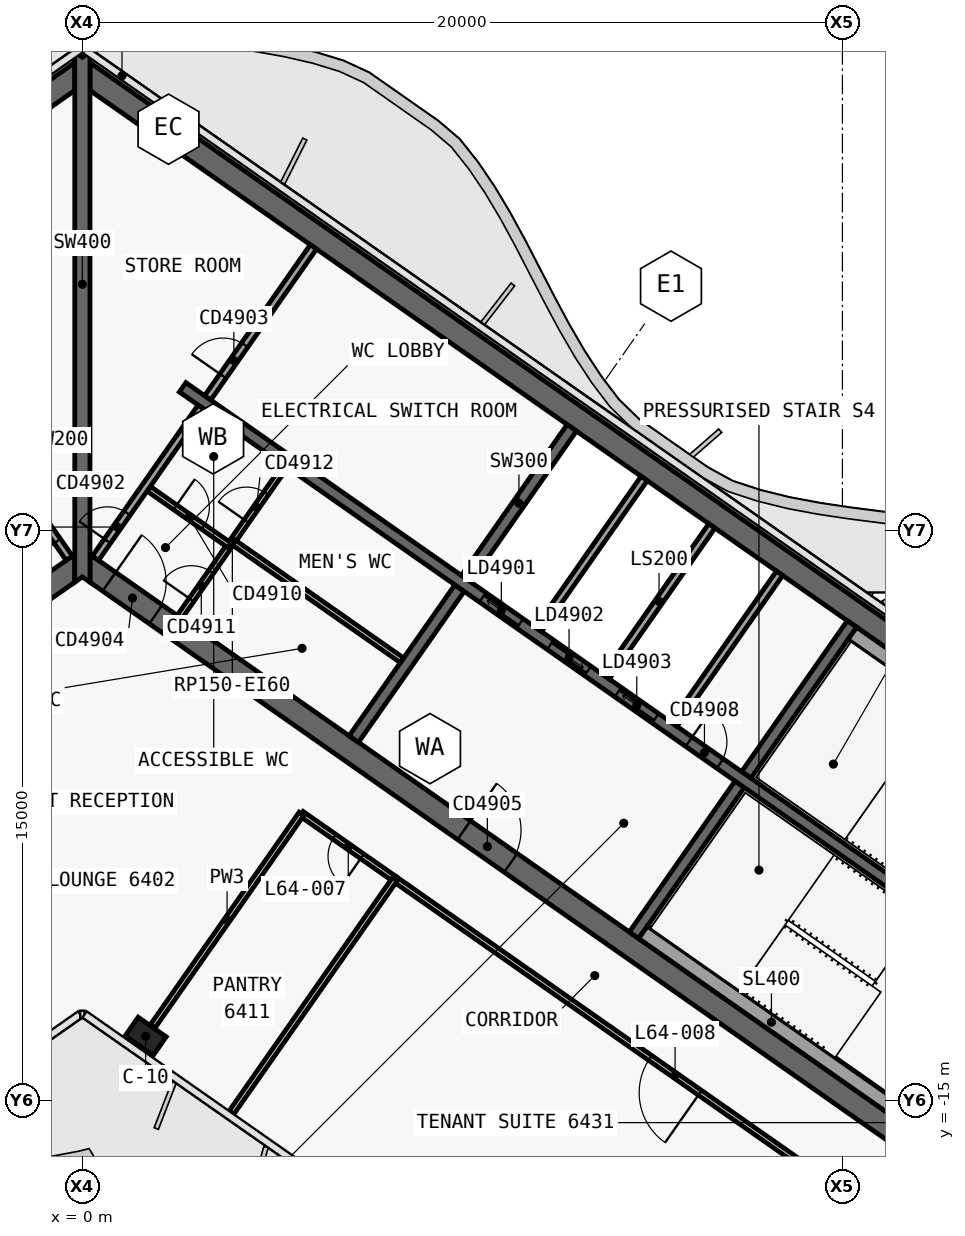
"""IFC4 building model, lengths in metres.
Left out: names, types, materials, properties, quantities, classifications, styles, units other than length and angle.
Written with IfcOpenShell. Run it as: python <this file> out.ifc"""

import sys

from ifc_helpers import new_model, si_unit, direction, frame, frame_2d, origin, origin_2d, place, context, subcontext, project, spatial, polyline, rectangle, outline, extrude, element, fill, save


model = new_model("IFC4")
c1 = context("Model", 3, precision=1e-05, world=origin(), true_north=direction((0.0, 1.0)))
c2 = subcontext(c1, "Body", "Model", "MODEL_VIEW")
j1 = project(units=[si_unit("LENGTHUNIT", "METRE"), si_unit("PLANEANGLEUNIT", "RADIAN")], contexts=[c1])
p1 = place(None, origin())
s1 = spatial("IfcSite", under=j1, at=p1, CompositionType="ELEMENT")
p2 = place(p1, origin())
s2 = spatial("IfcBuilding", under=s1, at=p2, CompositionType="ELEMENT")
p3 = place(p2, frame((0.0, 0.0, 272.2)))
s3 = spatial("IfcBuildingStorey", under=s2, at=p3, CompositionType="ELEMENT", Elevation=272.2)
p4 = place(p3, frame((-0.028, 12.066, 0.0), z_axis=(0.0, 0.0, 1.0), x_axis=(-0.819151382952, -0.573577380837, 0.0)))
e1 = element("IfcWall", 1, at=p4, inside=s3, PredefinedType="SHEAR", context=c2, shape_type="SweptSolid", body=[
    extrude(outline(polyline([(33.898, 0.3), (0.42, 0.3), (0.0, -0.3), (33.898, -0.3), (33.898, 0.3)])), origin(), (0.0, 0.0, 1.0), 3.9),
])
p5 = place(p3, frame((-0.028, -0.874, 0.0), z_axis=(0.0, 0.0, 1.0), x_axis=(-0.819150035022, -0.573579305871, 0.0)))
e2 = element("IfcWall", 2, at=p5, inside=s3, PredefinedType="SHEAR", context=c2, shape_type="SweptSolid", body=[
    extrude(outline(polyline([(26.476, 0.3), (0.42, 0.3), (0.0, -0.3), (26.476, -0.3), (26.476, 0.3)])), origin(), (0.0, 0.0, 1.0), 3.9),
])
p6 = place(p5, frame((2.976, 0.0, 0.0)))
e3 = element("IfcOpeningElement", 3, at=p6, cuts=e2, PredefinedType="OPENING", context=c2, shape_type="SweptSolid", body=[
    extrude(rectangle(XDim=2.4, YDim=2.1, at=frame_2d((1.2, 1.05))), frame((0.0, 0.31, 0.0), z_axis=(0.0, -1.0, 0.0), x_axis=(1.0, 0.0, 0.0)), (0.0, 0.0, 1.0), 0.62),
])
p7 = place(p5, frame((11.776, 0.0, 0.0)))
e4 = element("IfcOpeningElement", 4, at=p7, cuts=e2, PredefinedType="OPENING", context=c2, shape_type="SweptSolid", body=[
    extrude(rectangle(XDim=2.4, YDim=2.1, at=frame_2d((1.2, 1.05))), frame((0.0, 0.31, 0.0), z_axis=(0.0, -1.0, 0.0), x_axis=(1.0, 0.0, 0.0)), (0.0, 0.0, 1.0), 0.62),
])
p8 = place(p3, frame((0.028, 12.066, 0.0), z_axis=(0.0, 0.0, 1.0), x_axis=(0.819151382952, -0.573577380837, 0.0)))
e5 = element("IfcWall", 5, at=p8, inside=s3, PredefinedType="SHEAR", context=c2, shape_type="SweptSolid", body=[
    extrude(outline(polyline([(33.898, 0.3), (0.0, 0.3), (0.42, -0.3), (33.898, -0.3), (33.898, 0.3)])), origin(), (0.0, 0.0, 1.0), 3.9),
])
p9 = place(p3, frame((0.028, -0.874, 0.0), z_axis=(0.0, 0.0, 1.0), x_axis=(0.819150035022, -0.573579305871, 0.0)))
e6 = element("IfcWall", 6, at=p9, inside=s3, PredefinedType="SHEAR", context=c2, shape_type="SweptSolid", body=[
    extrude(outline(polyline([(26.476, 0.3), (0.0, 0.3), (0.42, -0.3), (26.476, -0.3), (26.476, 0.3)])), origin(), (0.0, 0.0, 1.0), 3.9),
])
p10 = place(p9, frame((0.826, 0.0, 0.0)))
e7 = element("IfcOpeningElement", 7, at=p10, cuts=e6, PredefinedType="OPENING", context=c2, shape_type="SweptSolid", body=[
    extrude(rectangle(XDim=1.5, YDim=2.1, at=frame_2d((0.75, 1.05))), frame((0.0, 0.31, 0.0), z_axis=(0.0, -1.0, 0.0), x_axis=(1.0, 0.0, 0.0)), (0.0, 0.0, 1.0), 0.62),
])
p11 = place(p9, frame((12.226, 0.0, 0.0)))
e8 = element("IfcOpeningElement", 8, at=p11, cuts=e6, PredefinedType="OPENING", context=c2, shape_type="SweptSolid", body=[
    extrude(rectangle(XDim=1.5, YDim=2.1, at=frame_2d((0.75, 1.05))), frame((0.0, 0.31, 0.0), z_axis=(0.0, -1.0, 0.0), x_axis=(1.0, 0.0, 0.0)), (0.0, 0.0, 1.0), 0.62),
])
p12 = place(p3, frame((7.143, -5.49, 0.0), z_axis=(0.0, 0.0, 1.0), x_axis=(0.573617744349, 0.819123118565, 0.0)))
e9 = element("IfcWall", 9, at=p12, inside=s3, PredefinedType="SHEAR", context=c2, shape_type="SweptSolid", body=[
    extrude(outline(polyline([(0.0, 0.15), (0.0, -0.15), (4.85, -0.15), (4.85, 0.15), (0.0, 0.15)])), origin(), (0.0, 0.0, 1.0), 3.9),
])
p13 = place(p3, frame((10.097, -1.271, 0.0), z_axis=(0.0, 0.0, 1.0), x_axis=(0.573560315113, 0.819163332265, 0.0)))
e10 = element("IfcWall", 10, at=p13, inside=s3, PredefinedType="SHEAR", context=c2, shape_type="SweptSolid", body=[
    extrude(outline(polyline([(4.85, -0.15), (4.85, 0.15), (0.0, 0.15), (0.0, -0.15), (4.85, -0.15)])), origin(), (0.0, 0.0, 1.0), 3.9),
])
p14 = place(p3, frame((14.515, -10.652, 0.0), z_axis=(0.0, 0.0, 1.0), x_axis=(0.573560315113, 0.819163332265, 0.0)))
e11 = element("IfcWall", 11, at=p14, inside=s3, PredefinedType="SHEAR", context=c2, shape_type="SweptSolid", body=[
    extrude(outline(polyline([(0.0, 0.15), (0.0, -0.15), (4.85, -0.15), (4.85, 0.15), (0.0, 0.15)])), origin(), (0.0, 0.0, 1.0), 3.9),
])
p15 = place(p3, frame((17.469, -6.433, 0.0), z_axis=(0.0, 0.0, 1.0), x_axis=(0.573594092424, 0.81913968109, 0.0)))
e12 = element("IfcWall", 12, at=p15, inside=s3, PredefinedType="SHEAR", context=c2, shape_type="SweptSolid", body=[
    extrude(outline(polyline([(4.85, -0.15), (4.85, 0.15), (0.0, 0.15), (0.0, -0.15), (4.85, -0.15)])), origin(), (0.0, 0.0, 1.0), 3.9),
])
p16 = place(p3, frame((2.638, 3.768, 0.0), z_axis=(0.0, 0.0, 1.0), x_axis=(0.819155014212, -0.573572194837, 0.0)))
e13 = element("IfcWall", 13, at=p16, inside=s3, PredefinedType="SHEAR", context=c2, shape_type="SweptSolid", body=[
    extrude(outline(polyline([(0.0, 0.15), (0.0, -0.15), (26.4, -0.15), (26.4, 0.15), (0.0, 0.15)])), origin(), (0.0, 0.0, 1.0), 3.9),
])
p17 = place(p16, frame((9.637, 0.0, 0.0)))
e14 = element("IfcOpeningElement", 14, at=p17, cuts=e13, PredefinedType="OPENING", context=c2, shape_type="SweptSolid", body=[
    extrude(rectangle(XDim=1.2, YDim=2.1, at=frame_2d((0.6, 1.05))), frame((0.0, 0.16, 0.0), z_axis=(0.0, -1.0, 0.0), x_axis=(1.0, 0.0, 0.0)), (0.0, 0.0, 1.0), 0.32),
])
p18 = place(p16, frame((11.812, 0.0, 0.0)))
e15 = element("IfcOpeningElement", 15, at=p18, cuts=e13, PredefinedType="OPENING", context=c2, shape_type="SweptSolid", body=[
    extrude(rectangle(XDim=1.2, YDim=2.1, at=frame_2d((0.6, 1.05))), frame((0.0, 0.16, 0.0), z_axis=(0.0, -1.0, 0.0), x_axis=(1.0, 0.0, 0.0)), (0.0, 0.0, 1.0), 0.32),
])
p19 = place(p16, frame((13.988, 0.0, 0.0)))
e16 = element("IfcOpeningElement", 16, at=p19, cuts=e13, PredefinedType="OPENING", context=c2, shape_type="SweptSolid", body=[
    extrude(rectangle(XDim=1.2, YDim=2.1, at=frame_2d((0.6, 1.05))), frame((0.0, 0.16, 0.0), z_axis=(0.0, -1.0, 0.0), x_axis=(1.0, 0.0, 0.0)), (0.0, 0.0, 1.0), 0.32),
])
p20 = place(p16, frame((16.262, 0.0, 0.0)))
e17 = element("IfcOpeningElement", 17, at=p20, cuts=e13, PredefinedType="OPENING", context=c2, shape_type="SweptSolid", body=[
    extrude(rectangle(XDim=1.0, YDim=2.1, at=frame_2d((0.5, 1.05))), frame((0.0, 0.16, 0.0), z_axis=(0.0, -1.0, 0.0), x_axis=(1.0, 0.0, 0.0)), (0.0, 0.0, 1.0), 0.32),
])
p21 = place(p3, frame((0.0, -1.361, 0.0), z_axis=(0.0, 0.0, 1.0), x_axis=(0.0, 1.0, 0.0)))
e18 = element("IfcWall", 18, at=p21, inside=s3, PredefinedType="SHEAR", context=c2, shape_type="SweptSolid", body=[
    extrude(outline(polyline([(0.14, 0.2), (0.0, 0.2), (0.14, 0.0), (0.0, -0.2), (0.14, -0.2), (1.012, -0.2), (12.94, -0.2), (13.813, -0.2), (13.893, -0.2), (13.933, -0.172), (13.813, 0.0), (13.933, 0.172), (13.893, 0.2), (13.813, 0.2), (12.94, 0.2), (1.012, 0.2), (0.14, 0.2)])), origin(), (0.0, 0.0, 1.0), 3.9),
])
p22 = place(p3, frame((1.665, -13.313, 0.0), z_axis=(0.0, 0.0, 1.0), x_axis=(0.819152044289, -0.573576436351, 0.0)))
e19 = element("IfcColumn", 19, at=p22, inside=s3, PredefinedType="COLUMN", context=c2, shape_type="SweptSolid", body=[
    extrude(rectangle(XDim=0.9, YDim=0.6, at=origin_2d()), origin(), (0.0, 0.0, 1.0), 3.9),
])
p23 = place(p3, frame((12.001, -2.605, 0.0), z_axis=(0.0, 0.0, 1.0), x_axis=(0.573560315113, 0.819163332265, 0.0)))
e20 = element("IfcWall", 20, at=p23, inside=s3, PredefinedType="SOLIDWALL", context=c2, shape_type="SweptSolid", body=[
    extrude(rectangle(XDim=4.85, YDim=0.2, at=frame_2d((2.425, 0.0))), origin(), (0.0, 0.0, 1.0), 3.9),
])
p24 = place(p3, frame((13.783, -3.852, 0.0), z_axis=(0.0, 0.0, 1.0), x_axis=(0.573594092424, 0.81913968109, 0.0)))
e21 = element("IfcWall", 21, at=p24, inside=s3, PredefinedType="SOLIDWALL", context=c2, shape_type="SweptSolid", body=[
    extrude(rectangle(XDim=4.85, YDim=0.2, at=frame_2d((2.425, 0.0))), origin(), (0.0, 0.0, 1.0), 3.9),
])
p25 = place(p3, frame((15.565, -5.1, 0.0), z_axis=(0.0, 0.0, 1.0), x_axis=(0.573560315113, 0.819163332265, 0.0)))
e22 = element("IfcWall", 22, at=p25, inside=s3, PredefinedType="SOLIDWALL", context=c2, shape_type="SweptSolid", body=[
    extrude(rectangle(XDim=4.85, YDim=0.2, at=frame_2d((2.425, 0.0))), origin(), (0.0, 0.0, 1.0), 3.9),
])
p26 = place(p3, frame((2.556, -2.278, 0.0), z_axis=(0.0, 0.0, 1.0), x_axis=(0.573560315113, 0.819163332265, 0.0)))
e23 = element("IfcWall", 23, at=p26, inside=s3, PredefinedType="PARTITIONING", context=c2, shape_type="SweptSolid", body=[
    extrude(rectangle(XDim=4.85, YDim=0.15, at=frame_2d((2.425, 0.0))), origin(), (0.0, 0.0, 1.0), 3.62),
])
p27 = place(p26, frame((0.55, 0.0, 0.0)))
e24 = element("IfcOpeningElement", 24, at=p27, cuts=e23, PredefinedType="OPENING", context=c2, shape_type="SweptSolid", body=[
    extrude(rectangle(XDim=0.9, YDim=2.1, at=frame_2d((0.45, 1.05))), frame((0.0, 0.085, 0.0), z_axis=(0.0, -1.0, 0.0), x_axis=(1.0, 0.0, 0.0)), (0.0, 0.0, 1.0), 0.17),
])
p28 = place(p26, frame((3.075, 0.0, 0.0)))
e25 = element("IfcOpeningElement", 25, at=p28, cuts=e23, PredefinedType="OPENING", context=c2, shape_type="SweptSolid", body=[
    extrude(rectangle(XDim=0.9, YDim=2.1, at=frame_2d((0.45, 1.05))), frame((0.0, 0.085, 0.0), z_axis=(0.0, -1.0, 0.0), x_axis=(1.0, 0.0, 0.0)), (0.0, 0.0, 1.0), 0.17),
])
p29 = place(p3, frame((1.745, 1.097, 0.0), z_axis=(0.0, 0.0, 1.0), x_axis=(0.819178980414, -0.573537965655, 0.0)))
e26 = element("IfcWall", 26, at=p29, inside=s3, PredefinedType="PARTITIONING", context=c2, shape_type="SweptSolid", body=[
    extrude(rectangle(XDim=2.6, YDim=0.15, at=frame_2d((1.3, 0.0))), origin(), (0.0, 0.0, 1.0), 3.62),
])
p30 = place(p29, frame((0.85, 0.0, 0.0)))
e27 = element("IfcOpeningElement", 27, at=p30, cuts=e26, PredefinedType="OPENING", context=c2, shape_type="SweptSolid", body=[
    extrude(rectangle(XDim=0.9, YDim=2.1, at=frame_2d((0.45, 1.05))), frame((0.0, 0.085, 0.0), z_axis=(0.0, -1.0, 0.0), x_axis=(1.0, 0.0, 0.0)), (0.0, 0.0, 1.0), 0.17),
])
p31 = place(p3, frame((3.947, -0.292, 0.0), z_axis=(0.0, 0.0, 1.0), x_axis=(0.819151939971, -0.573576585332, 0.0)))
e28 = element("IfcWall", 28, at=p31, inside=s3, PredefinedType="PARTITIONING", context=c2, shape_type="SweptSolid", body=[
    extrude(rectangle(XDim=5.45, YDim=0.15, at=frame_2d((2.725, 0.0))), origin(), (0.0, 0.0, 1.0), 3.62),
])
p32 = place(p3, frame((20.259, -2.71, 0.0), z_axis=(0.0, 0.0, 1.0), x_axis=(0.81914849389, -0.573581506813, 0.0)))
e29 = element("IfcWall", 29, at=p32, inside=s3, PredefinedType="SOLIDWALL", context=c2, shape_type="SweptSolid", body=[
    extrude(rectangle(XDim=8.25, YDim=0.4, at=frame_2d((4.125, 0.0))), origin(), (0.0, 0.0, 1.0), 3.62),
])
p33 = place(p3, frame((14.753, -10.574, 0.0), z_axis=(0.0, 0.0, 1.0), x_axis=(0.819158229677, -0.573567602601, 0.0)))
e30 = element("IfcWall", 30, at=p33, inside=s3, PredefinedType="SOLIDWALL", context=c2, shape_type="SweptSolid", body=[
    extrude(rectangle(XDim=8.25, YDim=0.4, at=frame_2d((4.125, 0.0))), origin(), (0.0, 0.0, 1.0), 3.62),
])
p34 = place(p3, frame((-0.344, -0.729, 0.0), z_axis=(0.0, 0.0, 1.0), x_axis=(-0.573560315113, 0.819163332265, 0.0)))
e31 = element("IfcWall", 31, at=p34, inside=s3, PredefinedType="SOLIDWALL", context=c2, shape_type="SweptSolid", body=[
    extrude(rectangle(XDim=4.85, YDim=0.2, at=frame_2d((2.425, 0.0))), origin(), (0.0, 0.0, 1.0), 3.62),
])
p35 = place(p34, frame((0.55, 0.0, 0.0)))
e32 = element("IfcOpeningElement", 32, at=p35, cuts=e31, PredefinedType="OPENING", context=c2, shape_type="SweptSolid", body=[
    extrude(rectangle(XDim=0.9, YDim=2.1, at=frame_2d((0.45, 1.05))), frame((0.0, 0.11, 0.0), z_axis=(0.0, -1.0, 0.0), x_axis=(1.0, 0.0, 0.0)), (0.0, 0.0, 1.0), 0.22),
])
p36 = place(p3, frame((0.344, -0.729, 0.0), z_axis=(0.0, 0.0, 1.0), x_axis=(0.573560315113, 0.819163332265, 0.0)))
e33 = element("IfcWall", 33, at=p36, inside=s3, PredefinedType="SOLIDWALL", context=c2, shape_type="SweptSolid", body=[
    extrude(rectangle(XDim=4.85, YDim=0.2, at=frame_2d((2.425, 0.0))), origin(), (0.0, 0.0, 1.0), 3.62),
])
p37 = place(p36, frame((0.55, 0.0, 0.0)))
e34 = element("IfcOpeningElement", 34, at=p37, cuts=e33, PredefinedType="OPENING", context=c2, shape_type="SweptSolid", body=[
    extrude(rectangle(XDim=0.9, YDim=2.1, at=frame_2d((0.45, 1.05))), frame((0.0, 0.11, 0.0), z_axis=(0.0, -1.0, 0.0), x_axis=(1.0, 0.0, 0.0)), (0.0, 0.0, 1.0), 0.22),
])
p38 = place(p3, frame((3.298, 3.49, 0.0), z_axis=(0.0, 0.0, 1.0), x_axis=(0.573560315113, 0.819163332265, 0.0)))
e35 = element("IfcWall", 35, at=p38, inside=s3, PredefinedType="SOLIDWALL", context=c2, shape_type="SweptSolid", body=[
    extrude(rectangle(XDim=4.85, YDim=0.2, at=frame_2d((2.425, 0.0))), origin(), (0.0, 0.0, 1.0), 3.62),
])
p39 = place(p38, frame((0.7, 0.0, 0.0)))
e36 = element("IfcOpeningElement", 36, at=p39, cuts=e35, PredefinedType="OPENING", context=c2, shape_type="SweptSolid", body=[
    extrude(rectangle(XDim=1.0, YDim=2.1, at=frame_2d((0.5, 1.05))), frame((0.0, 0.11, 0.0), z_axis=(0.0, -1.0, 0.0), x_axis=(1.0, 0.0, 0.0)), (0.0, 0.0, 1.0), 0.22),
])
p40 = place(p3, frame((8.225, -9.178, 0.0), z_axis=(0.0, 0.0, 1.0), x_axis=(-0.819132568355, 0.573604249862, 0.0)))
e37 = element("IfcWall", 37, at=p40, inside=s3, PredefinedType="PARTITIONING", context=c2, shape_type="SweptSolid", body=[
    extrude(rectangle(XDim=3.002, YDim=0.15, at=frame_2d((1.501, 0.0))), origin(), (0.0, 0.0, 1.0), 3.05),
])
p41 = place(p40, frame((1.051, 0.0, 0.0)))
e38 = element("IfcOpeningElement", 38, at=p41, cuts=e37, PredefinedType="OPENING", context=c2, shape_type="SweptSolid", body=[
    extrude(rectangle(XDim=0.9, YDim=2.1, at=frame_2d((0.45, 1.05))), frame((0.0, 0.085, 0.0), z_axis=(0.0, -1.0, 0.0), x_axis=(1.0, 0.0, 0.0)), (0.0, 0.0, 1.0), 0.17),
])
p42 = place(p3, frame((22.97, -19.502, 0.0), z_axis=(0.0, 0.0, 1.0), x_axis=(-0.819146545681, 0.573584289097, 0.0)))
e39 = element("IfcWall", 39, at=p42, inside=s3, PredefinedType="PARTITIONING", context=c2, shape_type="SweptSolid", body=[
    extrude(rectangle(XDim=18.004, YDim=0.15, at=frame_2d((9.002, 0.0))), origin(), (0.0, 0.0, 1.0), 3.05),
])
p43 = place(p42, frame((8.202, 0.0, 0.0)))
e40 = element("IfcOpeningElement", 40, at=p43, cuts=e39, PredefinedType="OPENING", context=c2, shape_type="SweptSolid", body=[
    extrude(rectangle(XDim=1.6, YDim=2.1, at=frame_2d((0.8, 1.05))), frame((0.0, 0.085, 0.0), z_axis=(0.0, -1.0, 0.0), x_axis=(1.0, 0.0, 0.0)), (0.0, 0.0, 1.0), 0.17),
])
p44 = place(p3, frame((8.224, -9.177, 0.0), z_axis=(0.0, 0.0, 1.0), x_axis=(-0.573560650686, -0.819163097304, 0.0)))
e41 = element("IfcWall", 41, at=p44, inside=s3, PredefinedType="PARTITIONING", context=c2, shape_type="SweptSolid", body=[
    extrude(rectangle(XDim=7.5, YDim=0.15, at=frame_2d((3.75, 0.0))), origin(), (0.0, 0.0, 1.0), 3.0),
])
p45 = place(p3, frame((1.849, -13.051, 0.0), z_axis=(0.0, 0.0, 1.0), x_axis=(0.573577493031, 0.819151304393, 0.0)))
e42 = element("IfcWall", 42, at=p45, inside=s3, PredefinedType="PARTITIONING", context=c2, shape_type="SweptSolid", body=[
    extrude(rectangle(XDim=6.83, YDim=0.15, at=frame_2d((3.415, 0.0))), origin(), (0.0, 0.0, 1.0), 3.05),
])
p46 = place(p17, origin())
e43 = element("IfcDoor", 43, at=p46, inside=s3, OperationType="SLIDING_TO_LEFT", PredefinedType="DOOR", context=c2, shape_type="SweptSolid", body=[
    extrude(rectangle(XDim=1.2, YDim=2.1, at=frame_2d((0.6, 1.05))), frame((0.0, 0.025, 0.0), z_axis=(0.0, -1.0, 0.0), x_axis=(1.0, 0.0, 0.0)), (0.0, 0.0, 1.0), 0.05),
])
fill(e14, e43)
p47 = place(p18, origin())
e44 = element("IfcDoor", 44, at=p47, inside=s3, OperationType="SLIDING_TO_RIGHT", PredefinedType="DOOR", context=c2, shape_type="SweptSolid", body=[
    extrude(rectangle(XDim=1.2, YDim=2.1, at=frame_2d((0.6, 1.05))), frame((0.0, 0.025, 0.0), z_axis=(0.0, -1.0, 0.0), x_axis=(1.0, 0.0, 0.0)), (0.0, 0.0, 1.0), 0.05),
])
fill(e15, e44)
p48 = place(p19, origin())
e45 = element("IfcDoor", 45, at=p48, inside=s3, OperationType="SLIDING_TO_LEFT", PredefinedType="DOOR", context=c2, shape_type="SweptSolid", body=[
    extrude(rectangle(XDim=1.2, YDim=2.1, at=frame_2d((0.6, 1.05))), frame((0.0, 0.025, 0.0), z_axis=(0.0, -1.0, 0.0), x_axis=(1.0, 0.0, 0.0)), (0.0, 0.0, 1.0), 0.05),
])
fill(e16, e45)
p49 = place(p20, origin())
e46 = element("IfcDoor", 46, at=p49, inside=s3, OperationType="SINGLE_SWING_RIGHT", PredefinedType="DOOR", context=c2, shape_type="SweptSolid", body=[
    extrude(rectangle(XDim=1.0, YDim=2.1, at=frame_2d((0.5, 1.05))), frame((0.0, 0.025, 0.0), z_axis=(0.0, -1.0, 0.0), x_axis=(1.0, 0.0, 0.0)), (0.0, 0.0, 1.0), 0.05),
])
fill(e17, e46)
p50 = place(p27, origin())
e47 = element("IfcDoor", 47, at=p50, inside=s3, OperationType="SINGLE_SWING_RIGHT", PredefinedType="DOOR", context=c2, shape_type="SweptSolid", body=[
    extrude(rectangle(XDim=0.9, YDim=2.1, at=frame_2d((0.45, 1.05))), frame((0.0, 0.025, 0.0), z_axis=(0.0, -1.0, 0.0), x_axis=(1.0, 0.0, 0.0)), (0.0, 0.0, 1.0), 0.05),
])
fill(e24, e47)
p51 = place(p30, origin())
e48 = element("IfcDoor", 48, at=p51, inside=s3, OperationType="SINGLE_SWING_RIGHT", PredefinedType="DOOR", context=c2, shape_type="SweptSolid", body=[
    extrude(rectangle(XDim=0.9, YDim=2.1, at=frame_2d((0.45, 1.05))), frame((0.0, 0.025, 0.0), z_axis=(0.0, -1.0, 0.0), x_axis=(1.0, 0.0, 0.0)), (0.0, 0.0, 1.0), 0.05),
])
fill(e27, e48)
p52 = place(p28, origin())
e49 = element("IfcDoor", 49, at=p52, inside=s3, OperationType="SINGLE_SWING_RIGHT", PredefinedType="DOOR", context=c2, shape_type="SweptSolid", body=[
    extrude(rectangle(XDim=0.9, YDim=2.1, at=frame_2d((0.45, 1.05))), frame((0.0, 0.025, 0.0), z_axis=(0.0, -1.0, 0.0), x_axis=(1.0, 0.0, 0.0)), (0.0, 0.0, 1.0), 0.05),
])
fill(e25, e49)
p53 = place(p10, origin())
e50 = element("IfcDoor", 50, at=p53, inside=s3, OperationType="SINGLE_SWING_RIGHT", PredefinedType="DOOR", context=c2, shape_type="SweptSolid", body=[
    extrude(rectangle(XDim=1.5, YDim=2.1, at=frame_2d((0.75, 1.05))), frame((0.0, 0.025, 0.0), z_axis=(0.0, -1.0, 0.0), x_axis=(1.0, 0.0, 0.0)), (0.0, 0.0, 1.0), 0.05),
])
fill(e7, e50)
p54 = place(p11, origin())
e51 = element("IfcDoor", 51, at=p54, inside=s3, OperationType="DOUBLE_DOOR_SINGLE_SWING", PredefinedType="DOOR", context=c2, shape_type="SweptSolid", body=[
    extrude(rectangle(XDim=1.5, YDim=2.1, at=frame_2d((0.75, 1.05))), frame((0.0, 0.025, 0.0), z_axis=(0.0, -1.0, 0.0), x_axis=(1.0, 0.0, 0.0)), (0.0, 0.0, 1.0), 0.05),
])
fill(e8, e51)
p55 = place(p35, origin())
e52 = element("IfcDoor", 52, at=p55, inside=s3, OperationType="SINGLE_SWING_RIGHT", PredefinedType="DOOR", context=c2, shape_type="SweptSolid", body=[
    extrude(rectangle(XDim=0.9, YDim=2.1, at=frame_2d((0.45, 1.05))), frame((0.0, 0.025, 0.0), z_axis=(0.0, -1.0, 0.0), x_axis=(1.0, 0.0, 0.0)), (0.0, 0.0, 1.0), 0.05),
])
fill(e32, e52)
p56 = place(p37, origin())
e53 = element("IfcDoor", 53, at=p56, inside=s3, OperationType="SINGLE_SWING_RIGHT", PredefinedType="DOOR", context=c2, shape_type="SweptSolid", body=[
    extrude(rectangle(XDim=0.9, YDim=2.1, at=frame_2d((0.45, 1.05))), frame((0.0, 0.025, 0.0), z_axis=(0.0, -1.0, 0.0), x_axis=(1.0, 0.0, 0.0)), (0.0, 0.0, 1.0), 0.05),
])
fill(e34, e53)
p57 = place(p39, origin())
e54 = element("IfcDoor", 54, at=p57, inside=s3, OperationType="SINGLE_SWING_RIGHT", PredefinedType="DOOR", context=c2, shape_type="SweptSolid", body=[
    extrude(rectangle(XDim=1.0, YDim=2.1, at=frame_2d((0.5, 1.05))), frame((0.0, 0.025, 0.0), z_axis=(0.0, -1.0, 0.0), x_axis=(1.0, 0.0, 0.0)), (0.0, 0.0, 1.0), 0.05),
])
fill(e36, e54)
p58 = place(p41, origin())
e55 = element("IfcDoor", 55, at=p58, inside=s3, OperationType="SINGLE_SWING_RIGHT", PredefinedType="DOOR", context=c2, shape_type="SweptSolid", body=[
    extrude(rectangle(XDim=0.9, YDim=2.1, at=frame_2d((0.45, 1.05))), frame((0.0, 0.025, 0.0), z_axis=(0.0, -1.0, 0.0), x_axis=(1.0, 0.0, 0.0)), (0.0, 0.0, 1.0), 0.05),
])
fill(e38, e55)
p59 = place(p43, origin())
e56 = element("IfcDoor", 56, at=p59, inside=s3, OperationType="DOUBLE_DOOR_SINGLE_SWING", PredefinedType="DOOR", context=c2, shape_type="SweptSolid", body=[
    extrude(rectangle(XDim=1.6, YDim=2.1, at=frame_2d((0.8, 1.05))), frame((0.0, 0.025, 0.0), z_axis=(0.0, -1.0, 0.0), x_axis=(1.0, 0.0, 0.0)), (0.0, 0.0, 1.0), 0.05),
])
fill(e40, e56)
save(model, sys.argv[1])
